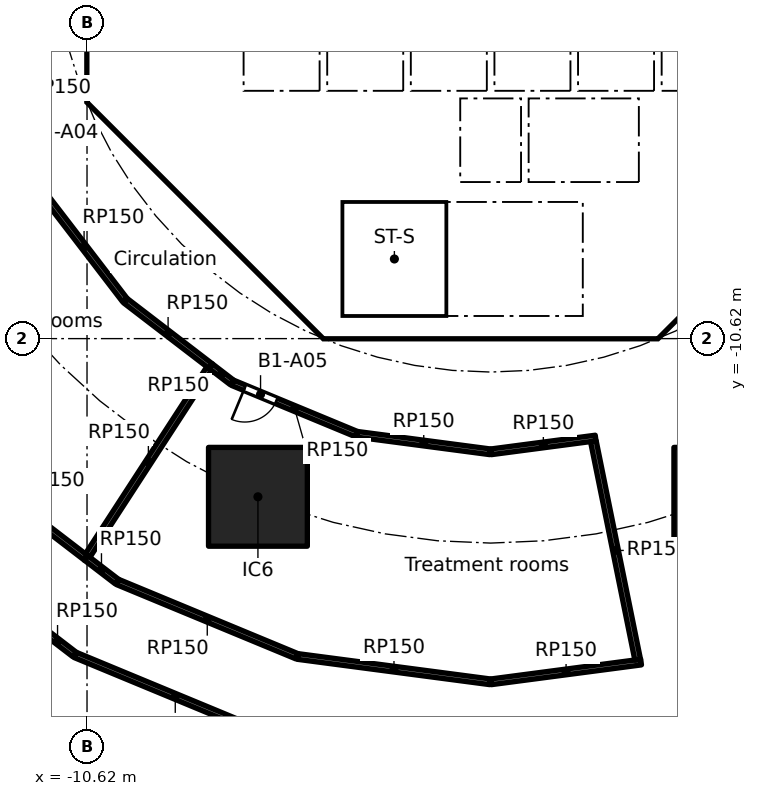
"""IFC4 building model, lengths in metres.
Left out: names, types, materials, properties, quantities, classifications, styles, units other than length and angle.
Written with IfcOpenShell. Run it as: python <this file> out.ifc"""

import sys

from ifc_helpers import new_model, si_unit, direction, frame, frame_2d, origin, origin_2d, place, context, subcontext, project, spatial, polyline, rectangle, outline, extrude, element, fill, save


model = new_model("IFC4")
c1 = context("Model", 3, precision=1e-05, world=origin(), true_north=direction((0.0, 1.0)))
c2 = subcontext(c1, "Body", "Model", "MODEL_VIEW")
j1 = project(units=[si_unit("LENGTHUNIT", "METRE"), si_unit("PLANEANGLEUNIT", "RADIAN")], contexts=[c1])
p1 = place(None, origin())
s1 = spatial("IfcSite", under=j1, at=p1, CompositionType="ELEMENT")
p2 = place(p1, origin())
s2 = spatial("IfcBuilding", under=s1, at=p2, CompositionType="ELEMENT")
p3 = place(p2, frame((0.0, 0.0, -5.0)))
s3 = spatial("IfcBuildingStorey", under=s2, at=p3, CompositionType="ELEMENT", Elevation=-5.0)
for number, where, z_axis, x_axis in (
    (1, (-6.123, -14.782, 0.0), (0.0, 0.0, 1.0), (1.0, 0.0, 0.0)),
    (2, (6.123, -14.782, 0.0), (0.0, 0.0, 1.0), (1.0, 0.0, 0.0)),
):
    element("IfcColumn", number, at=place(p3, frame(where, z_axis=z_axis, x_axis=x_axis)), inside=s3, PredefinedType="COLUMN", context=c2, shape_type="SweptSolid", body=[
        extrude(rectangle(XDim=2.6, YDim=2.6, at=origin_2d()), origin(), (0.0, 0.0, 1.0), 5.0),
    ])
p4 = place(p3, frame((-10.325, 3.801, 0.0), z_axis=(0.0, 0.0, 1.0), x_axis=(0.0, -1.0, 0.0)))
e3 = element("IfcWall", 3, at=p4, inside=s3, PredefinedType="SHEAR", context=c2, shape_type="SweptSolid", body=[
    extrude(rectangle(XDim=7.602, YDim=0.6, at=frame_2d((3.801, 0.0))), origin(), (0.0, 0.0, 1.0), 4.6),
])
p5 = place(p4, frame((0.651, 0.0, 0.0)))
e4 = element("IfcOpeningElement", 4, at=p5, cuts=e3, PredefinedType="OPENING", context=c2, shape_type="SweptSolid", body=[
    extrude(rectangle(XDim=1.5, YDim=2.1, at=frame_2d((0.75, 1.05))), frame((0.0, 0.31, 0.0), z_axis=(0.0, -1.0, 0.0), x_axis=(1.0, 0.0, 0.0)), (0.0, 0.0, 1.0), 0.62),
])
p6 = place(p4, frame((5.451, 0.0, 0.0)))
e5 = element("IfcOpeningElement", 5, at=p6, cuts=e3, PredefinedType="OPENING", context=c2, shape_type="SweptSolid", body=[
    extrude(rectangle(XDim=1.5, YDim=2.1, at=frame_2d((0.75, 1.05))), frame((0.0, 0.31, 0.0), z_axis=(0.0, -1.0, 0.0), x_axis=(1.0, 0.0, 0.0)), (0.0, 0.0, 1.0), 0.62),
])
p7 = place(p3, frame((-9.988, -4.613, 0.0), z_axis=(0.0, 0.0, 1.0), x_axis=(0.707106781187, -0.707106781187, 0.0)))
e6 = element("IfcWall", 6, at=p7, inside=s3, PredefinedType="SHEAR", context=c2, shape_type="SweptSolid", body=[
    extrude(rectangle(XDim=7.602, YDim=0.6, at=frame_2d((3.801, 0.0))), origin(), (0.0, 0.0, 1.0), 4.6),
])
p8 = place(p7, frame((6.151, 0.0, 0.0)))
e7 = element("IfcOpeningElement", 7, at=p8, cuts=e6, PredefinedType="OPENING", context=c2, shape_type="SweptSolid", body=[
    extrude(rectangle(XDim=1.1, YDim=2.1, at=frame_2d((0.55, 1.05))), frame((0.0, 0.31, 0.0), z_axis=(0.0, -1.0, 0.0), x_axis=(1.0, 0.0, 0.0)), (0.0, 0.0, 1.0), 0.62),
])
p9 = place(p3, frame((4.613, -9.988, 0.0), z_axis=(0.0, 0.0, 1.0), x_axis=(0.707106781187, 0.707106781187, 0.0)))
e8 = element("IfcWall", 8, at=p9, inside=s3, PredefinedType="SHEAR", context=c2, shape_type="SweptSolid", body=[
    extrude(rectangle(XDim=7.602, YDim=0.6, at=frame_2d((3.801, 0.0))), origin(), (0.0, 0.0, 1.0), 4.6),
])
p10 = place(p9, frame((3.201, 0.0, 0.0)))
e9 = element("IfcOpeningElement", 9, at=p10, cuts=e8, PredefinedType="OPENING", context=c2, shape_type="SweptSolid", body=[
    extrude(rectangle(XDim=1.2, YDim=2.1, at=frame_2d((0.6, 1.05))), frame((0.0, 0.31, 0.0), z_axis=(0.0, -1.0, 0.0), x_axis=(1.0, 0.0, 0.0)), (0.0, 0.0, 1.0), 0.62),
])
p11 = place(p3, frame((4.0, -10.025, 0.0), z_axis=(0.0, 0.0, 1.0), x_axis=(0.0, 1.0, 0.0)))
e10 = element("IfcWall", 10, at=p11, inside=s3, PredefinedType="SOLIDWALL", context=c2, shape_type="SweptSolid", body=[
    extrude(rectangle(XDim=3.0, YDim=0.2, at=frame_2d((1.5, 0.0))), origin(), (0.0, 0.0, 1.0), 4.6),
])
p12 = place(p11, frame((0.975, 0.0, 0.0)))
e11 = element("IfcOpeningElement", 11, at=p12, cuts=e10, PredefinedType="OPENING", context=c2, shape_type="SweptSolid", body=[
    extrude(rectangle(XDim=1.1, YDim=2.1, at=frame_2d((0.55, 1.05))), frame((0.0, 0.11, 0.0), z_axis=(0.0, -1.0, 0.0), x_axis=(1.0, 0.0, 0.0)), (0.0, 0.0, 1.0), 0.22),
])
p13 = place(p3, frame((-5.8, -8.227, 0.0), z_axis=(0.0, 0.0, 1.0), x_axis=(0.0, 1.0, 0.0)))
e12 = element("IfcWall", 12, at=p13, inside=s3, PredefinedType="PARTITIONING", context=c2, shape_type="SweptSolid", body=[
    extrude(rectangle(XDim=3.927, YDim=0.15, at=frame_2d((1.963, 0.0))), origin(), (0.0, 0.0, 1.0), 4.6),
])
p14 = place(p13, frame((2.615, 0.0, 0.0)))
e13 = element("IfcOpeningElement", 13, at=p14, cuts=e12, PredefinedType="OPENING", context=c2, shape_type="SweptSolid", body=[
    extrude(rectangle(XDim=0.9, YDim=2.1, at=frame_2d((0.45, 1.05))), frame((0.0, 0.085, 0.0), z_axis=(0.0, -1.0, 0.0), x_axis=(1.0, 0.0, 0.0)), (0.0, 0.0, 1.0), 0.17),
])
p15 = place(p13, frame((0.539, 0.0, 0.0)))
e14 = element("IfcOpeningElement", 14, at=p15, cuts=e12, PredefinedType="OPENING", context=c2, shape_type="SweptSolid", body=[
    extrude(rectangle(XDim=0.9, YDim=2.1, at=frame_2d((0.45, 1.05))), frame((0.0, 0.085, 0.0), z_axis=(0.0, -1.0, 0.0), x_axis=(1.0, 0.0, 0.0)), (0.0, 0.0, 1.0), 0.17),
])
p16 = place(p3, frame((4.0, -6.5, 0.0), z_axis=(0.0, 0.0, 1.0), x_axis=(0.0, 1.0, 0.0)))
e15 = element("IfcWall", 15, at=p16, inside=s3, PredefinedType="SOLIDWALL", context=c2, shape_type="SweptSolid", body=[
    extrude(rectangle(XDim=2.2, YDim=0.2, at=frame_2d((1.1, 0.0))), origin(), (0.0, 0.0, 1.0), 4.6),
])
p17 = place(p16, frame((0.55, 0.0, 0.0)))
e16 = element("IfcOpeningElement", 16, at=p17, cuts=e15, PredefinedType="OPENING", context=c2, shape_type="SweptSolid", body=[
    extrude(rectangle(XDim=1.1, YDim=2.1, at=frame_2d((0.55, 1.05))), frame((0.0, 0.11, 0.0), z_axis=(0.0, -1.0, 0.0), x_axis=(1.0, 0.0, 0.0)), (0.0, 0.0, 1.0), 0.22),
])
p18 = place(p3, frame((-4.0, -6.5, 0.0), z_axis=(0.0, 0.0, 1.0), x_axis=(0.0, 1.0, 0.0)))
e17 = element("IfcWall", 17, at=p18, inside=s3, PredefinedType="SOLIDWALL", context=c2, shape_type="SweptSolid", body=[
    extrude(rectangle(XDim=2.2, YDim=0.2, at=frame_2d((1.1, 0.0))), origin(), (0.0, 0.0, 1.0), 4.6),
])
p19 = place(p18, frame((0.65, 0.0, 0.0)))
e18 = element("IfcOpeningElement", 18, at=p19, cuts=e17, PredefinedType="OPENING", context=c2, shape_type="SweptSolid", body=[
    extrude(rectangle(XDim=0.9, YDim=2.1, at=frame_2d((0.45, 1.05))), frame((0.0, 0.11, 0.0), z_axis=(0.0, -1.0, 0.0), x_axis=(1.0, 0.0, 0.0)), (0.0, 0.0, 1.0), 0.22),
])
p20 = place(p3, origin())
e19 = element("IfcWall", 19, at=p20, inside=s3, PredefinedType="SHEAR", context=c2, shape_type="SweptSolid", body=[
    extrude(outline(polyline([(-10.625, -3.801), (-10.025, -3.801), (-10.025, -4.152), (-9.776, -4.401), (-10.2, -4.825), (-10.625, -4.401), (-10.625, -3.801)])), origin(), (0.0, 0.0, 1.0), 4.6),
])
p21 = place(p3, origin())
e20 = element("IfcWall", 20, at=p21, inside=s3, PredefinedType="SHEAR", context=c2, shape_type="SweptSolid", body=[
    extrude(outline(polyline([(-4.152, -10.025), (4.152, -10.025), (4.401, -9.776), (4.825, -10.2), (4.401, -10.625), (-4.401, -10.625), (-4.825, -10.2), (-4.401, -9.776), (-4.152, -10.025)])), origin(), (0.0, 0.0, 1.0), 4.6),
])
for number, where, z_axis, x_axis in (
    (21, (-0.9, -6.5, 0.0), (0.0, 0.0, 1.0), (0.0, 1.0, 0.0)),
    (22, (0.9, -6.5, 0.0), (0.0, 0.0, 1.0), (0.0, 1.0, 0.0)),
):
    element("IfcWall", number, at=place(p3, frame(where, z_axis=z_axis, x_axis=x_axis)), inside=s3, PredefinedType="SOLIDWALL", context=c2, shape_type="SweptSolid", body=[
        extrude(rectangle(XDim=2.2, YDim=0.2, at=frame_2d((1.1, 0.0))), origin(), (0.0, 0.0, 1.0), 4.6),
    ])
p22 = place(p3, origin())
e23 = element("IfcWall", 23, at=p22, inside=s3, PredefinedType="SOLIDWALL", context=c2, shape_type="SweptSolid", body=[
    extrude(outline(polyline([(-6.7, -2.1), (-6.5, -2.1), (-6.5, -4.1), (-4.5, -4.1), (-4.5, -2.1), (-4.3, -2.1), (-4.3, -4.1), (-2.3, -4.1), (-2.3, -2.1), (-2.1, -2.1), (-2.1, -4.1), (-0.1, -4.1), (-0.1, -2.1), (0.1, -2.1), (0.1, -4.1), (2.1, -4.1), (2.1, -2.1), (2.3, -2.1), (2.3, -4.1), (4.3, -4.1), (4.3, -2.1), (4.5, -2.1), (4.5, -4.1), (6.5, -4.1), (6.5, -2.1), (6.7, -2.1), (6.7, -4.3), (-6.7, -4.3), (-6.7, -2.1)])), origin(), (0.0, 0.0, 1.0), 4.6),
])
p23 = place(p3, frame((-10.025, -4.0, 0.0), z_axis=(0.0, 0.0, 1.0), x_axis=(1.0, 0.0, 0.0)))
e24 = element("IfcWall", 24, at=p23, inside=s3, PredefinedType="PARTITIONING", context=c2, shape_type="SweptSolid", body=[
    extrude(rectangle(XDim=3.325, YDim=0.2, at=frame_2d((1.662, 0.0))), origin(), (0.0, 0.0, 1.0), 4.6),
])
p24 = place(p3, frame((-8.001, -6.1, 0.0), z_axis=(0.0, 0.0, 1.0), x_axis=(1.0, 0.0, 0.0)))
e25 = element("IfcWall", 25, at=p24, inside=s3, PredefinedType="PARTITIONING", context=c2, shape_type="SweptSolid", body=[
    extrude(rectangle(XDim=2.126, YDim=0.15, at=frame_2d((1.063, 0.0))), origin(), (0.0, 0.0, 1.0), 4.6),
])
p25 = place(p3, origin())
e26 = element("IfcWall", 26, at=p25, inside=s3, PredefinedType="SOLIDWALL", context=c2, shape_type="SweptSolid", body=[
    extrude(outline(polyline([(-3.9, -10.025), (-4.1, -10.025), (-4.1, -7.025), (-3.9, -7.025), (-3.9, -10.025)])), origin(), (0.0, 0.0, 1.0), 4.6),
])
p26 = place(p3, origin())
e27 = element("IfcWall", 27, at=p26, inside=s3, PredefinedType="SOLIDWALL", context=c2, shape_type="SweptSolid", body=[
    extrude(outline(polyline([(4.1, -7.025), (-4.1, -7.025), (-4.1, -6.5), (4.1, -6.5), (4.1, -7.025)])), origin(), (0.0, 0.0, 1.0), 4.6),
])
p27 = place(p3, frame((-13.886, -13.903, 0.0), z_axis=(0.0, 0.0, 1.0), x_axis=(0.793356294792, -0.608757578609, 0.0)))
e28 = element("IfcWall", 28, at=p27, inside=s3, PredefinedType="PARTITIONING", context=c2, shape_type="SweptSolid", body=[
    extrude(rectangle(XDim=4.087, YDim=0.15, at=frame_2d((2.043, 0.0))), origin(), (0.0, 0.0, 1.0), 4.6),
])
p28 = place(p3, frame((-10.945, -18.933, 0.0), z_axis=(0.0, 0.0, 1.0), x_axis=(-0.793350355506, 0.608765318837, 0.0)))
e29 = element("IfcWall", 29, at=p28, inside=s3, PredefinedType="PARTITIONING", context=c2, shape_type="SweptSolid", body=[
    extrude(rectangle(XDim=1.136, YDim=0.15, at=frame_2d((0.568, 0.0))), origin(), (0.0, 0.0, 1.0), 4.6),
])
p29 = place(p3, frame((-10.644, -16.391, 0.0), z_axis=(0.0, 0.0, 1.0), x_axis=(0.793344280216, -0.608773236147, 0.0)))
e30 = element("IfcWall", 30, at=p29, inside=s3, PredefinedType="PARTITIONING", context=c2, shape_type="SweptSolid", body=[
    extrude(rectangle(XDim=1.02, YDim=0.15, at=frame_2d((0.51, 0.0))), origin(), (0.0, 0.0, 1.0), 4.6),
])
p30 = place(p3, frame((-9.815, -17.023, 0.0), z_axis=(0.0, 0.0, 1.0), x_axis=(0.923883976017, -0.382672704618, 0.0)))
e31 = element("IfcWall", 31, at=p30, inside=s3, PredefinedType="PARTITIONING", context=c2, shape_type="SweptSolid", body=[
    extrude(rectangle(XDim=5.106, YDim=0.15, at=frame_2d((2.553, 0.0))), origin(), (0.0, 0.0, 1.0), 4.6),
])
p31 = place(p3, frame((-9.624, -9.607, 0.0), z_axis=(0.0, 0.0, 1.0), x_axis=(-0.608736710054, 0.793372307201, 0.0)))
e32 = element("IfcWall", 32, at=p31, inside=s3, PredefinedType="PARTITIONING", context=c2, shape_type="SweptSolid", body=[
    extrude(rectangle(XDim=3.527, YDim=0.15, at=frame_2d((1.763, 0.0))), origin(), (0.0, 0.0, 1.0), 4.6),
])
p32 = place(p3, frame((-7.407, -11.406, 0.0), z_axis=(0.0, 0.0, 1.0), x_axis=(-0.544646109016, -0.838665973993, 0.0)))
e33 = element("IfcWall", 33, at=p32, inside=s3, PredefinedType="PARTITIONING", context=c2, shape_type="SweptSolid", body=[
    extrude(rectangle(XDim=5.868, YDim=0.15, at=frame_2d((2.934, 0.0))), origin(), (0.0, 0.0, 1.0), 4.6),
])
p33 = place(p3, frame((-7.366, -11.343, 0.0), z_axis=(0.0, 0.0, 1.0), x_axis=(-0.793375345407, 0.608732750311, 0.0)))
e34 = element("IfcWall", 34, at=p33, inside=s3, PredefinedType="PARTITIONING", context=c2, shape_type="SweptSolid", body=[
    extrude(rectangle(XDim=2.824, YDim=0.15, at=frame_2d((1.412, 0.0))), origin(), (0.0, 0.0, 1.0), 4.6),
])
p34 = place(p3, frame((-6.809, -11.771, 0.0), z_axis=(0.0, 0.0, 1.0), x_axis=(-0.793360087844, 0.608752635326, 0.0)))
e35 = element("IfcWall", 35, at=p34, inside=s3, PredefinedType="PARTITIONING", context=c2, shape_type="SweptSolid", body=[
    extrude(rectangle(XDim=0.702, YDim=0.15, at=frame_2d((0.351, 0.0))), origin(), (0.0, 0.0, 1.0), 4.6),
])
p35 = place(p3, frame((-5.672, -21.121, 0.0), z_axis=(0.0, 0.0, 1.0), x_axis=(-0.923876568882, 0.38269058712, 0.0)))
e36 = element("IfcWall", 36, at=p35, inside=s3, PredefinedType="PARTITIONING", context=c2, shape_type="SweptSolid", body=[
    extrude(rectangle(XDim=5.686, YDim=0.15, at=frame_2d((2.843, 0.0))), origin(), (0.0, 0.0, 1.0), 4.6),
])
p36 = place(p3, frame((-5.074, -18.984, 0.0), z_axis=(0.0, 0.0, 1.0), x_axis=(0.991445342988, -0.130522533942, 0.0)))
e37 = element("IfcWall", 37, at=p36, inside=s3, PredefinedType="PARTITIONING", context=c2, shape_type="SweptSolid", body=[
    extrude(rectangle(XDim=5.106, YDim=0.15, at=frame_2d((2.553, 0.0))), origin(), (0.0, 0.0, 1.0), 4.6),
])
p37 = place(p3, frame((-3.531, -13.132, 0.0), z_axis=(0.0, 0.0, 1.0), x_axis=(-0.923881838111, 0.382677866108, 0.0)))
e38 = element("IfcWall", 38, at=p37, inside=s3, PredefinedType="PARTITIONING", context=c2, shape_type="SweptSolid", body=[
    extrude(rectangle(XDim=3.527, YDim=0.15, at=frame_2d((1.763, 0.0))), origin(), (0.0, 0.0, 1.0), 4.6),
])
p38 = place(p37, frame((2.281, 0.0, 0.0)))
e39 = element("IfcOpeningElement", 39, at=p38, cuts=e38, PredefinedType="OPENING", context=c2, shape_type="SweptSolid", body=[
    extrude(rectangle(XDim=0.9, YDim=2.1, at=frame_2d((0.45, 1.05))), frame((0.0, 0.085, 0.0), z_axis=(0.0, -1.0, 0.0), x_axis=(1.0, 0.0, 0.0)), (0.0, 0.0, 1.0), 0.17),
])
p39 = place(p3, frame((0.012, -19.65, 0.0), z_axis=(0.0, 0.0, 1.0), x_axis=(0.991447196759, 0.13050845198, 0.0)))
e40 = element("IfcWall", 40, at=p39, inside=s3, PredefinedType="PARTITIONING", context=c2, shape_type="SweptSolid", body=[
    extrude(rectangle(XDim=3.981, YDim=0.15, at=frame_2d((1.99, 0.0))), origin(), (0.0, 0.0, 1.0), 4.6),
])
p40 = place(p3, frame((-0.012, -13.598, 0.0), z_axis=(0.0, 0.0, 1.0), x_axis=(-0.991448403586, 0.130499283623, 0.0)))
e41 = element("IfcWall", 41, at=p40, inside=s3, PredefinedType="PARTITIONING", context=c2, shape_type="SweptSolid", body=[
    extrude(rectangle(XDim=3.527, YDim=0.15, at=frame_2d((1.763, 0.0))), origin(), (0.0, 0.0, 1.0), 4.6),
])
p41 = place(p3, frame((2.762, -13.236, 0.0), z_axis=(0.0, 0.0, 1.0), x_axis=(-0.991448603925, -0.130497761571, 0.0)))
e42 = element("IfcWall", 42, at=p41, inside=s3, PredefinedType="PARTITIONING", context=c2, shape_type="SweptSolid", body=[
    extrude(rectangle(XDim=2.774, YDim=0.15, at=frame_2d((1.387, 0.0))), origin(), (0.0, 0.0, 1.0), 4.6),
])
p42 = place(p3, frame((3.869, -19.067, 0.0), z_axis=(0.0, 0.0, 1.0), x_axis=(-0.198877500107, 0.980024356815, 0.0)))
e43 = element("IfcWall", 43, at=p42, inside=s3, PredefinedType="PARTITIONING", context=c2, shape_type="SweptSolid", body=[
    extrude(rectangle(XDim=5.864, YDim=0.15, at=frame_2d((2.932, 0.0))), origin(), (0.0, 0.0, 1.0), 4.6),
])
p43 = place(p17, origin())
e44 = element("IfcDoor", 44, at=p43, inside=s3, OperationType="DOUBLE_DOOR_SLIDING", PredefinedType="DOOR", context=c2, shape_type="SweptSolid", body=[
    extrude(rectangle(XDim=1.1, YDim=2.1, at=frame_2d((0.55, 1.05))), frame((0.0, 0.025, 0.0), z_axis=(0.0, -1.0, 0.0), x_axis=(1.0, 0.0, 0.0)), (0.0, 0.0, 1.0), 0.05),
])
fill(e16, e44)
p44 = place(p12, origin())
e45 = element("IfcDoor", 45, at=p44, inside=s3, OperationType="SINGLE_SWING_RIGHT", PredefinedType="DOOR", context=c2, shape_type="SweptSolid", body=[
    extrude(rectangle(XDim=1.1, YDim=2.1, at=frame_2d((0.55, 1.05))), frame((0.0, 0.025, 0.0), z_axis=(0.0, -1.0, 0.0), x_axis=(1.0, 0.0, 0.0)), (0.0, 0.0, 1.0), 0.05),
])
fill(e11, e45)
p45 = place(p14, origin())
e46 = element("IfcDoor", 46, at=p45, inside=s3, OperationType="SINGLE_SWING_RIGHT", PredefinedType="DOOR", context=c2, shape_type="SweptSolid", body=[
    extrude(rectangle(XDim=0.9, YDim=2.1, at=frame_2d((0.45, 1.05))), frame((0.0, 0.025, 0.0), z_axis=(0.0, -1.0, 0.0), x_axis=(1.0, 0.0, 0.0)), (0.0, 0.0, 1.0), 0.05),
])
fill(e13, e46)
p46 = place(p15, origin())
e47 = element("IfcDoor", 47, at=p46, inside=s3, OperationType="SINGLE_SWING_RIGHT", PredefinedType="DOOR", context=c2, shape_type="SweptSolid", body=[
    extrude(rectangle(XDim=0.9, YDim=2.1, at=frame_2d((0.45, 1.05))), frame((0.0, 0.025, 0.0), z_axis=(0.0, -1.0, 0.0), x_axis=(1.0, 0.0, 0.0)), (0.0, 0.0, 1.0), 0.05),
])
fill(e14, e47)
p47 = place(p19, frame((0.9, 0.0, 0.0), x_axis=(-1.0, 0.0, 0.0)))
e48 = element("IfcDoor", 48, at=p47, inside=s3, OperationType="SINGLE_SWING_LEFT", PredefinedType="DOOR", context=c2, shape_type="SweptSolid", body=[
    extrude(rectangle(XDim=0.9, YDim=2.1, at=frame_2d((0.45, 1.05))), frame((0.0, 0.025, 0.0), z_axis=(0.0, -1.0, 0.0), x_axis=(1.0, 0.0, 0.0)), (0.0, 0.0, 1.0), 0.05),
])
fill(e18, e48)
p48 = place(p6, origin())
e49 = element("IfcDoor", 49, at=p48, inside=s3, OperationType="DOUBLE_DOOR_SINGLE_SWING", PredefinedType="DOOR", context=c2, shape_type="SweptSolid", body=[
    extrude(rectangle(XDim=1.5, YDim=2.1, at=frame_2d((0.75, 1.05))), frame((0.0, 0.025, 0.0), z_axis=(0.0, -1.0, 0.0), x_axis=(1.0, 0.0, 0.0)), (0.0, 0.0, 1.0), 0.05),
])
fill(e5, e49)
p49 = place(p8, origin())
e50 = element("IfcDoor", 50, at=p49, inside=s3, OperationType="SINGLE_SWING_RIGHT", PredefinedType="DOOR", context=c2, shape_type="SweptSolid", body=[
    extrude(rectangle(XDim=1.1, YDim=2.1, at=frame_2d((0.55, 1.05))), frame((0.0, 0.025, 0.0), z_axis=(0.0, -1.0, 0.0), x_axis=(1.0, 0.0, 0.0)), (0.0, 0.0, 1.0), 0.05),
])
fill(e7, e50)
p50 = place(p38, origin())
e51 = element("IfcDoor", 51, at=p50, inside=s3, OperationType="SINGLE_SWING_RIGHT", PredefinedType="DOOR", context=c2, shape_type="SweptSolid", body=[
    extrude(rectangle(XDim=0.9, YDim=2.1, at=frame_2d((0.45, 1.05))), frame((0.0, 0.025, 0.0), z_axis=(0.0, -1.0, 0.0), x_axis=(1.0, 0.0, 0.0)), (0.0, 0.0, 1.0), 0.05),
])
fill(e39, e51)
save(model, sys.argv[1])
